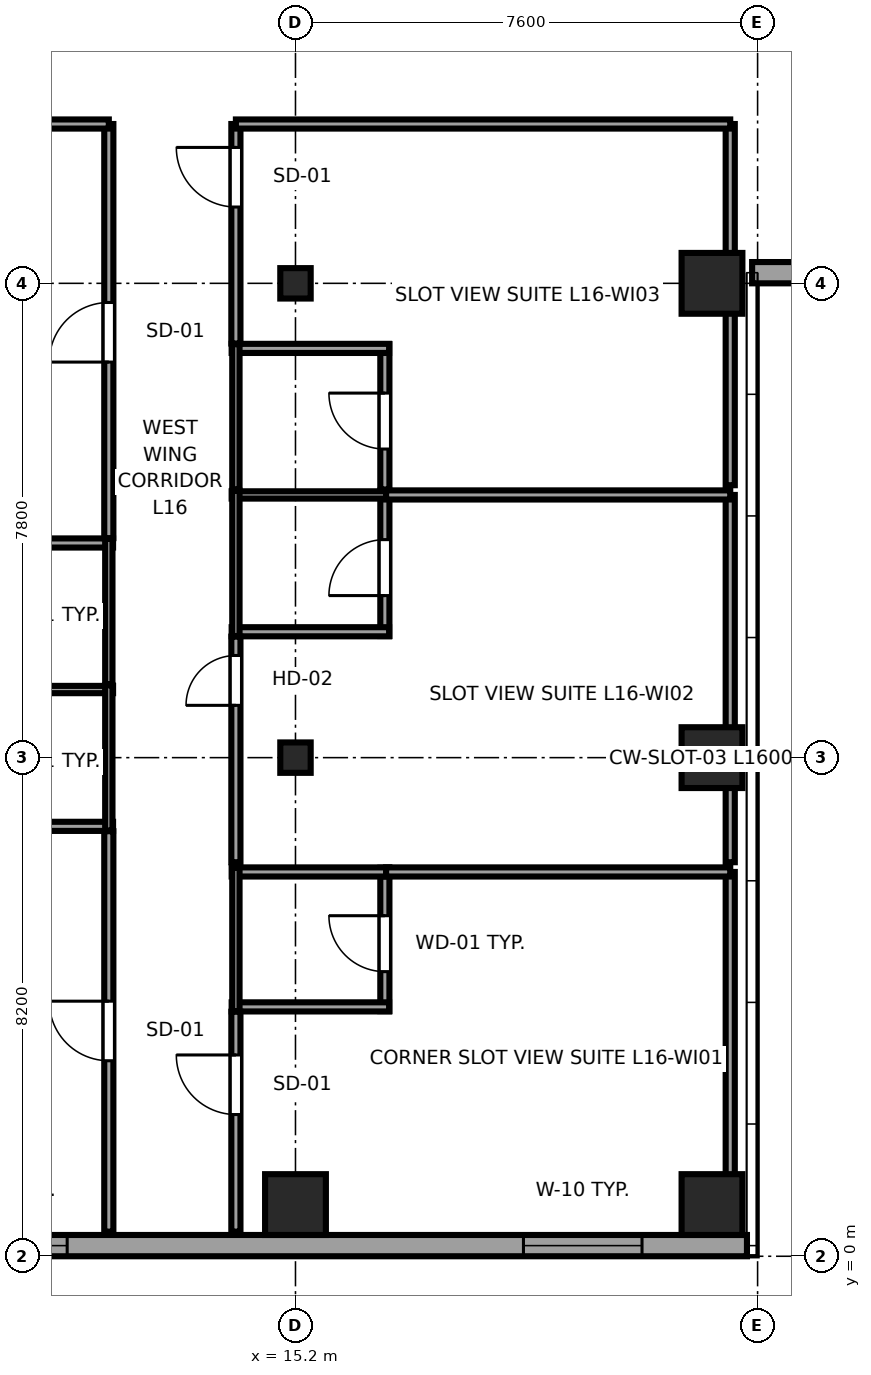
"""IFC4 building model, lengths in metres.
Left out: names, types, materials, properties, quantities, classifications, styles, units other than length and angle.
Written with IfcOpenShell. Run it as: python <this file> out.ifc"""

import sys

from ifc_helpers import new_model, si_unit, direction, frame, frame_2d, origin, origin_2d, place, context, subcontext, project, spatial, rectangle, i_section, extrude, source, transform, mapped, element, fill, save


model = new_model("IFC4")
c1 = context("Model", 3, precision=1e-05, world=origin(), true_north=direction((0.0, 1.0)))
c2 = subcontext(c1, "Body", "Model", "MODEL_VIEW")
j1 = project(units=[si_unit("LENGTHUNIT", "METRE"), si_unit("PLANEANGLEUNIT", "RADIAN")], contexts=[c1])
p1 = place(None, origin())
s1 = spatial("IfcSite", under=j1, at=p1, CompositionType="ELEMENT")
p2 = place(p1, origin())
s2 = spatial("IfcBuilding", under=s1, at=p2, CompositionType="ELEMENT")
p3 = place(p2, frame((0.0, 0.0, 67.5)))
s3 = spatial("IfcBuildingStorey", under=s2, at=p3, CompositionType="ELEMENT", Elevation=67.5)
m1 = source(origin(), c2, "Body", "SweptSolid", [
    extrude(rectangle(XDim=1.0, YDim=1.0, at=origin_2d()), origin(), (0.0, 0.0, 1.0), 3.55),
])
p4 = place(p3, frame((15.2, 0.85, 0.0), z_axis=(0.0, 0.0, 1.0), x_axis=(1.0, 0.0, 0.0)))
e1 = element("IfcColumn", 1, at=p4, inside=s3, PredefinedType="COLUMN", context=c2, shape_type="MappedRepresentation", body=[
    mapped(m1, transform((0.0, 0.0, 0.0), x_axis=(1.0, 0.0, 0.0), y_axis=(0.0, 1.0, 0.0), z_axis=(0.0, 0.0, 1.0), scale=1.0)),
])
m2 = source(origin(), c2, "Body", "SweptSolid", [
    extrude(i_section(OverallWidth=0.5, OverallDepth=0.5, WebThickness=0.028, FlangeThickness=0.045, at=origin_2d()), origin(), (0.0, 0.0, 1.0), 3.55),
])
for number, where, z_axis, x_axis in (
    (2, (15.2, 8.2, 0.0), (0.0, 0.0, 1.0), (1.0, 0.0, 0.0)),
    (3, (15.2, 16.0, 0.0), (0.0, 0.0, 1.0), (1.0, 0.0, 0.0)),
):
    element("IfcColumn", number, at=place(p3, frame(where, z_axis=z_axis, x_axis=x_axis)), inside=s3, PredefinedType="COLUMN", context=c2, shape_type="MappedRepresentation", body=[
        mapped(m2, transform((0.0, 0.0, 0.0), x_axis=(1.0, 0.0, 0.0), y_axis=(0.0, 1.0, 0.0), z_axis=(0.0, 0.0, 1.0), scale=1.0)),
    ])
for number, where, z_axis, x_axis in (
    (4, (22.05, 0.85, 0.0), (0.0, 0.0, 1.0), (1.0, 0.0, 0.0)),
    (5, (22.05, 8.2, 0.0), (0.0, 0.0, 1.0), (1.0, 0.0, 0.0)),
    (6, (22.05, 16.0, 0.0), (0.0, 0.0, 1.0), (1.0, 0.0, 0.0)),
):
    element("IfcColumn", number, at=place(p3, frame(where, z_axis=z_axis, x_axis=x_axis)), inside=s3, PredefinedType="COLUMN", context=c2, shape_type="MappedRepresentation", body=[
        mapped(m1, transform((0.0, 0.0, 0.0), x_axis=(1.0, 0.0, 0.0), y_axis=(0.0, 1.0, 0.0), z_axis=(0.0, 0.0, 1.0), scale=1.0)),
    ])
p5 = place(p3, frame((4.617, 0.175, 0.0), z_axis=(0.0, 0.0, 1.0), x_axis=(1.0, 0.0, 0.0)))
e7 = element("IfcWall", 7, at=p5, inside=s3, PredefinedType="SOLIDWALL", context=c2, shape_type="SweptSolid", body=[
    extrude(rectangle(XDim=18.008, YDim=0.35, at=frame_2d((9.004, 0.0))), origin(), (0.0, 0.0, 1.0), 3.37),
])
p6 = place(p5, frame((4.878, 0.0, 0.68)))
e8 = element("IfcOpeningElement", 8, at=p6, cuts=e7, PredefinedType="OPENING", context=c2, shape_type="SweptSolid", body=[
    extrude(rectangle(XDim=1.95, YDim=1.82, at=frame_2d((0.975, 0.91))), frame((0.0, 0.185, 0.0), z_axis=(0.0, -1.0, 0.0), x_axis=(1.0, 0.0, 0.0)), (0.0, 0.0, 1.0), 0.37),
])
p7 = place(p5, frame((14.332, 0.0, 0.68)))
e9 = element("IfcOpeningElement", 9, at=p7, cuts=e7, PredefinedType="OPENING", context=c2, shape_type="SweptSolid", body=[
    extrude(rectangle(XDim=1.95, YDim=1.82, at=frame_2d((0.975, 0.91))), frame((0.0, 0.185, 0.0), z_axis=(0.0, -1.0, 0.0), x_axis=(1.0, 0.0, 0.0)), (0.0, 0.0, 1.0), 0.37),
])
p8 = place(p3, frame((22.71, 16.175, 0.0), z_axis=(0.0, 0.0, 1.0), x_axis=(1.0, 0.0, 0.0)))
e10 = element("IfcWall", 10, at=p8, inside=s3, PredefinedType="SOLIDWALL", context=c2, shape_type="SweptSolid", body=[
    extrude(rectangle(XDim=11.58, YDim=0.35, at=frame_2d((5.79, 0.0))), origin(), (0.0, 0.0, 1.0), 2.748),
])
p9 = place(p8, frame((2.22, 0.0, 0.68)))
e11 = element("IfcOpeningElement", 11, at=p9, cuts=e10, PredefinedType="OPENING", context=c2, shape_type="SweptSolid", body=[
    extrude(rectangle(XDim=1.95, YDim=1.82, at=frame_2d((0.975, 0.91))), frame((0.0, 0.185, 0.0), z_axis=(0.0, -1.0, 0.0), x_axis=(1.0, 0.0, 0.0)), (0.0, 0.0, 1.0), 0.37),
])
p10 = place(p8, frame((7.41, 0.0, 0.68)))
e12 = element("IfcOpeningElement", 12, at=p10, cuts=e10, PredefinedType="OPENING", context=c2, shape_type="SweptSolid", body=[
    extrude(rectangle(XDim=1.95, YDim=1.82, at=frame_2d((0.975, 0.91))), frame((0.0, 0.185, 0.0), z_axis=(0.0, -1.0, 0.0), x_axis=(1.0, 0.0, 0.0)), (0.0, 0.0, 1.0), 0.37),
])
p11 = place(p3, frame((9.61, 7.07, 0.0), z_axis=(0.0, 0.0, 1.0), x_axis=(1.0, 0.0, 0.0)))
e13 = element("IfcWall", 13, at=p11, inside=s3, PredefinedType="PARTITIONING", context=c2, shape_type="SweptSolid", body=[
    extrude(rectangle(XDim=2.59, YDim=0.15, at=frame_2d((1.295, 0.0))), origin(), (0.0, 0.0, 1.0), 3.37),
])
p12 = place(p3, frame((9.61, 9.32, 0.0), z_axis=(0.0, 0.0, 1.0), x_axis=(1.0, 0.0, 0.0)))
e14 = element("IfcWall", 14, at=p12, inside=s3, PredefinedType="PLUMBINGWALL", context=c2, shape_type="SweptSolid", body=[
    extrude(rectangle(XDim=2.59, YDim=0.12, at=frame_2d((1.295, 0.0))), origin(), (0.0, 0.0, 1.0), 3.37),
])
p13 = place(p3, frame((12.13, 7.0, 0.0), z_axis=(0.0, 0.0, 1.0), x_axis=(0.0, 1.0, 0.0)))
e15 = element("IfcWall", 15, at=p13, inside=s3, PredefinedType="PLUMBINGWALL", context=c2, shape_type="SweptSolid", body=[
    extrude(rectangle(XDim=2.39, YDim=0.12, at=frame_2d((1.195, 0.0))), origin(), (0.0, 0.0, 1.0), 3.37),
])
p14 = place(p3, frame((9.61, 11.73, 0.0), z_axis=(0.0, 0.0, 1.0), x_axis=(1.0, 0.0, 0.0)))
e16 = element("IfcWall", 16, at=p14, inside=s3, PredefinedType="PARTITIONING", context=c2, shape_type="SweptSolid", body=[
    extrude(rectangle(XDim=2.59, YDim=0.15, at=frame_2d((1.295, 0.0))), origin(), (0.0, 0.0, 1.0), 3.37),
])
p15 = place(p3, frame((12.13, 9.41, 0.0), z_axis=(0.0, 0.0, 1.0), x_axis=(0.0, 1.0, 0.0)))
e17 = element("IfcWall", 17, at=p15, inside=s3, PredefinedType="PLUMBINGWALL", context=c2, shape_type="SweptSolid", body=[
    extrude(rectangle(XDim=2.39, YDim=0.12, at=frame_2d((1.195, 0.0))), origin(), (0.0, 0.0, 1.0), 3.37),
])
p16 = place(p3, frame((16.67, 4.031, 0.0), z_axis=(0.0, 0.0, 1.0), x_axis=(0.0, 1.0, 0.0)))
e18 = element("IfcWall", 18, at=p16, inside=s3, PredefinedType="PARTITIONING", context=c2, shape_type="SweptSolid", body=[
    extrude(rectangle(XDim=2.359, YDim=0.15, at=frame_2d((1.179, 0.0))), origin(), (0.0, 0.0, 1.0), 3.37),
])
p17 = place(p16, frame((0.649, 0.0, 0.0)))
e19 = element("IfcOpeningElement", 19, at=p17, cuts=e18, PredefinedType="OPENING", context=c2, shape_type="SweptSolid", body=[
    extrude(rectangle(XDim=0.92, YDim=2.01, at=frame_2d((0.46, 1.005))), frame((0.0, 0.085, 0.0), z_axis=(0.0, -1.0, 0.0), x_axis=(1.0, 0.0, 0.0)), (0.0, 0.0, 1.0), 0.17),
])
for number, where, z_axis, x_axis in (
    (20, (14.15, 4.101, 0.0), (0.0, 0.0, 1.0), (1.0, 0.0, 0.0)),
    (21, (14.15, 6.32, 0.0), (0.0, 0.0, 1.0), (1.0, 0.0, 0.0)),
):
    element("IfcWall", number, at=place(p3, frame(where, z_axis=z_axis, x_axis=x_axis)), inside=s3, PredefinedType="PARTITIONING", context=c2, shape_type="SweptSolid", body=[
        extrude(rectangle(XDim=2.59, YDim=0.15, at=frame_2d((1.295, 0.0))), origin(), (0.0, 0.0, 1.0), 3.37),
    ])
p18 = place(p3, frame((14.22, 4.031, 0.0), z_axis=(0.0, 0.0, 1.0), x_axis=(0.0, 1.0, 0.0)))
e22 = element("IfcWall", 22, at=p18, inside=s3, PredefinedType="PLUMBINGWALL", context=c2, shape_type="SweptSolid", body=[
    extrude(rectangle(XDim=2.359, YDim=0.12, at=frame_2d((1.179, 0.0))), origin(), (0.0, 0.0, 1.0), 3.37),
])
p19 = place(p3, frame((16.67, 10.2, 0.0), z_axis=(0.0, 0.0, 1.0), x_axis=(0.0, 1.0, 0.0)))
e23 = element("IfcWall", 23, at=p19, inside=s3, PredefinedType="PARTITIONING", context=c2, shape_type="SweptSolid", body=[
    extrude(rectangle(XDim=2.39, YDim=0.15, at=frame_2d((1.195, 0.0))), origin(), (0.0, 0.0, 1.0), 3.37),
])
p20 = place(p19, frame((0.665, 0.0, 0.0)))
e24 = element("IfcOpeningElement", 24, at=p20, cuts=e23, PredefinedType="OPENING", context=c2, shape_type="SweptSolid", body=[
    extrude(rectangle(XDim=0.92, YDim=2.01, at=frame_2d((0.46, 1.005))), frame((0.0, 0.085, 0.0), z_axis=(0.0, -1.0, 0.0), x_axis=(1.0, 0.0, 0.0)), (0.0, 0.0, 1.0), 0.17),
])
p21 = place(p3, frame((14.15, 10.27, 0.0), z_axis=(0.0, 0.0, 1.0), x_axis=(1.0, 0.0, 0.0)))
e25 = element("IfcWall", 25, at=p21, inside=s3, PredefinedType="PARTITIONING", context=c2, shape_type="SweptSolid", body=[
    extrude(rectangle(XDim=2.59, YDim=0.15, at=frame_2d((1.295, 0.0))), origin(), (0.0, 0.0, 1.0), 3.37),
])
p22 = place(p3, frame((14.15, 12.52, 0.0), z_axis=(0.0, 0.0, 1.0), x_axis=(1.0, 0.0, 0.0)))
e26 = element("IfcWall", 26, at=p22, inside=s3, PredefinedType="PLUMBINGWALL", context=c2, shape_type="SweptSolid", body=[
    extrude(rectangle(XDim=2.59, YDim=0.12, at=frame_2d((1.295, 0.0))), origin(), (0.0, 0.0, 1.0), 3.37),
])
p23 = place(p3, frame((14.22, 10.2, 0.0), z_axis=(0.0, 0.0, 1.0), x_axis=(0.0, 1.0, 0.0)))
e27 = element("IfcWall", 27, at=p23, inside=s3, PredefinedType="PLUMBINGWALL", context=c2, shape_type="SweptSolid", body=[
    extrude(rectangle(XDim=2.39, YDim=0.12, at=frame_2d((1.195, 0.0))), origin(), (0.0, 0.0, 1.0), 3.37),
])
p24 = place(p3, frame((16.67, 12.61, 0.0), z_axis=(0.0, 0.0, 1.0), x_axis=(0.0, 1.0, 0.0)))
e28 = element("IfcWall", 28, at=p24, inside=s3, PredefinedType="PARTITIONING", context=c2, shape_type="SweptSolid", body=[
    extrude(rectangle(XDim=2.39, YDim=0.15, at=frame_2d((1.195, 0.0))), origin(), (0.0, 0.0, 1.0), 3.37),
])
p25 = place(p24, frame((0.665, 0.0, 0.0)))
e29 = element("IfcOpeningElement", 29, at=p25, cuts=e28, PredefinedType="OPENING", context=c2, shape_type="SweptSolid", body=[
    extrude(rectangle(XDim=0.92, YDim=2.01, at=frame_2d((0.46, 1.005))), frame((0.0, 0.085, 0.0), z_axis=(0.0, -1.0, 0.0), x_axis=(1.0, 0.0, 0.0)), (0.0, 0.0, 1.0), 0.17),
])
p26 = place(p3, frame((14.15, 14.93, 0.0), z_axis=(0.0, 0.0, 1.0), x_axis=(1.0, 0.0, 0.0)))
e30 = element("IfcWall", 30, at=p26, inside=s3, PredefinedType="PARTITIONING", context=c2, shape_type="SweptSolid", body=[
    extrude(rectangle(XDim=2.59, YDim=0.15, at=frame_2d((1.295, 0.0))), origin(), (0.0, 0.0, 1.0), 3.37),
])
p27 = place(p3, frame((14.22, 12.61, 0.0), z_axis=(0.0, 0.0, 1.0), x_axis=(0.0, 1.0, 0.0)))
e31 = element("IfcWall", 31, at=p27, inside=s3, PredefinedType="PLUMBINGWALL", context=c2, shape_type="SweptSolid", body=[
    extrude(rectangle(XDim=2.39, YDim=0.12, at=frame_2d((1.195, 0.0))), origin(), (0.0, 0.0, 1.0), 3.37),
])
p28 = place(p3, frame((12.13, 0.405, 0.0), z_axis=(0.0, 0.0, 1.0), x_axis=(0.0, 1.0, 0.0)))
e32 = element("IfcWall", 32, at=p28, inside=s3, PredefinedType="PARTITIONING", context=c2, shape_type="SweptSolid", body=[
    extrude(rectangle(XDim=6.585, YDim=0.15, at=frame_2d((3.292, 0.0))), origin(), (0.0, 0.0, 1.0), 3.37),
])
p29 = place(p28, frame((2.81, 0.0, 0.0)))
e33 = element("IfcOpeningElement", 33, at=p29, cuts=e32, PredefinedType="OPENING", context=c2, shape_type="SweptSolid", body=[
    extrude(rectangle(XDim=0.98, YDim=2.12, at=frame_2d((0.49, 1.06))), frame((0.0, 0.085, 0.0), z_axis=(0.0, -1.0, 0.0), x_axis=(1.0, 0.0, 0.0)), (0.0, 0.0, 1.0), 0.17),
])
p30 = place(p3, frame((12.13, 11.81, 0.0), z_axis=(0.0, 0.0, 1.0), x_axis=(0.0, 1.0, 0.0)))
e34 = element("IfcWall", 34, at=p30, inside=s3, PredefinedType="PARTITIONING", context=c2, shape_type="SweptSolid", body=[
    extrude(rectangle(XDim=6.81, YDim=0.15, at=frame_2d((3.405, 0.0))), origin(), (0.0, 0.0, 1.0), 3.37),
])
p31 = place(p30, frame((2.895, 0.0, 0.0)))
e35 = element("IfcOpeningElement", 35, at=p31, cuts=e34, PredefinedType="OPENING", context=c2, shape_type="SweptSolid", body=[
    extrude(rectangle(XDim=0.98, YDim=2.12, at=frame_2d((0.49, 1.06))), frame((0.0, 0.085, 0.0), z_axis=(0.0, -1.0, 0.0), x_axis=(1.0, 0.0, 0.0)), (0.0, 0.0, 1.0), 0.17),
])
p32 = place(p3, frame((0.405, 18.62, 0.0), z_axis=(0.0, 0.0, 1.0), x_axis=(1.0, 0.0, 0.0)))
e36 = element("IfcWall", 36, at=p32, inside=s3, PredefinedType="PARTITIONING", context=c2, shape_type="SweptSolid", body=[
    extrude(rectangle(XDim=11.725, YDim=0.15, at=frame_2d((5.862, 0.0))), origin(), (0.0, 0.0, 1.0), 3.37),
])
p33 = place(p3, frame((14.22, 0.405, 0.0), z_axis=(0.0, 0.0, 1.0), x_axis=(0.0, 1.0, 0.0)))
e37 = element("IfcWall", 37, at=p33, inside=s3, PredefinedType="PARTITIONING", context=c2, shape_type="SweptSolid", body=[
    extrude(rectangle(XDim=3.616, YDim=0.15, at=frame_2d((1.808, 0.0))), origin(), (0.0, 0.0, 1.0), 3.37),
])
p34 = place(p33, frame((1.926, 0.0, 0.0)))
e38 = element("IfcOpeningElement", 38, at=p34, cuts=e37, PredefinedType="OPENING", context=c2, shape_type="SweptSolid", body=[
    extrude(rectangle(XDim=0.98, YDim=2.12, at=frame_2d((0.49, 1.06))), frame((0.0, 0.085, 0.0), z_axis=(0.0, -1.0, 0.0), x_axis=(1.0, 0.0, 0.0)), (0.0, 0.0, 1.0), 0.17),
])
p35 = place(p3, frame((22.35, 0.405, 0.0), z_axis=(0.0, 0.0, 1.0), x_axis=(0.0, 1.0, 0.0)))
e39 = element("IfcWall", 39, at=p35, inside=s3, PredefinedType="PARTITIONING", context=c2, shape_type="SweptSolid", body=[
    extrude(rectangle(XDim=5.915, YDim=0.15, at=frame_2d((2.958, 0.0))), origin(), (0.0, 0.0, 1.0), 3.37),
])
p36 = place(p3, frame((16.69, 6.32, 0.0), z_axis=(0.0, 0.0, 1.0), x_axis=(1.0, 0.0, 0.0)))
e40 = element("IfcWall", 40, at=p36, inside=s3, PredefinedType="PARTITIONING", context=c2, shape_type="SweptSolid", body=[
    extrude(rectangle(XDim=5.66, YDim=0.15, at=frame_2d((2.83, 0.0))), origin(), (0.0, 0.0, 1.0), 3.37),
])
p37 = place(p3, frame((14.22, 6.48, 0.0), z_axis=(0.0, 0.0, 1.0), x_axis=(0.0, 1.0, 0.0)))
e41 = element("IfcWall", 41, at=p37, inside=s3, PredefinedType="PARTITIONING", context=c2, shape_type="SweptSolid", body=[
    extrude(rectangle(XDim=3.71, YDim=0.15, at=frame_2d((1.855, 0.0))), origin(), (0.0, 0.0, 1.0), 3.37),
])
p38 = place(p37, frame((2.58, 0.0, 0.0)))
e42 = element("IfcOpeningElement", 42, at=p38, cuts=e41, PredefinedType="OPENING", context=c2, shape_type="SweptSolid", body=[
    extrude(rectangle(XDim=0.82, YDim=2.01, at=frame_2d((0.41, 1.005))), frame((0.0, 0.085, 0.0), z_axis=(0.0, -1.0, 0.0), x_axis=(1.0, 0.0, 0.0)), (0.0, 0.0, 1.0), 0.17),
])
p39 = place(p3, frame((22.35, 6.48, 0.0), z_axis=(0.0, 0.0, 1.0), x_axis=(0.0, 1.0, 0.0)))
e43 = element("IfcWall", 43, at=p39, inside=s3, PredefinedType="PARTITIONING", context=c2, shape_type="SweptSolid", body=[
    extrude(rectangle(XDim=6.04, YDim=0.15, at=frame_2d((3.02, 0.0))), origin(), (0.0, 0.0, 1.0), 3.37),
])
p40 = place(p3, frame((16.69, 12.52, 0.0), z_axis=(0.0, 0.0, 1.0), x_axis=(1.0, 0.0, 0.0)))
e44 = element("IfcWall", 44, at=p40, inside=s3, PredefinedType="PARTITIONING", context=c2, shape_type="SweptSolid", body=[
    extrude(rectangle(XDim=5.66, YDim=0.15, at=frame_2d((2.83, 0.0))), origin(), (0.0, 0.0, 1.0), 3.37),
])
p41 = place(p3, frame((14.22, 15.01, 0.0), z_axis=(0.0, 0.0, 1.0), x_axis=(0.0, 1.0, 0.0)))
e45 = element("IfcWall", 45, at=p41, inside=s3, PredefinedType="PARTITIONING", context=c2, shape_type="SweptSolid", body=[
    extrude(rectangle(XDim=3.61, YDim=0.15, at=frame_2d((1.805, 0.0))), origin(), (0.0, 0.0, 1.0), 3.37),
])
p42 = place(p41, frame((2.245, 0.0, 0.0)))
e46 = element("IfcOpeningElement", 46, at=p42, cuts=e45, PredefinedType="OPENING", context=c2, shape_type="SweptSolid", body=[
    extrude(rectangle(XDim=0.98, YDim=2.12, at=frame_2d((0.49, 1.06))), frame((0.0, 0.085, 0.0), z_axis=(0.0, -1.0, 0.0), x_axis=(1.0, 0.0, 0.0)), (0.0, 0.0, 1.0), 0.17),
])
p43 = place(p3, frame((22.35, 12.68, 0.0), z_axis=(0.0, 0.0, 1.0), x_axis=(0.0, 1.0, 0.0)))
e47 = element("IfcWall", 47, at=p43, inside=s3, PredefinedType="PARTITIONING", context=c2, shape_type="SweptSolid", body=[
    extrude(rectangle(XDim=5.94, YDim=0.15, at=frame_2d((2.97, 0.0))), origin(), (0.0, 0.0, 1.0), 3.37),
])
p44 = place(p3, frame((14.22, 18.62, 0.0), z_axis=(0.0, 0.0, 1.0), x_axis=(1.0, 0.0, 0.0)))
e48 = element("IfcWall", 48, at=p44, inside=s3, PredefinedType="PARTITIONING", context=c2, shape_type="SweptSolid", body=[
    extrude(rectangle(XDim=8.13, YDim=0.15, at=frame_2d((4.065, 0.0))), origin(), (0.0, 0.0, 1.0), 3.37),
])
m3 = source(origin(), c2, "Body", "SweptSolid", [
    extrude(rectangle(XDim=1.95, YDim=1.82, at=frame_2d((0.975, 0.91))), frame((0.0, 0.09, 0.0), z_axis=(0.0, -1.0, 0.0), x_axis=(1.0, 0.0, 0.0)), (0.0, 0.0, 1.0), 0.06),
])
p45 = place(p6, origin())
e49 = element("IfcWindow", 49, at=p45, inside=s3, PartitioningType="DOUBLE_PANEL_VERTICAL", PredefinedType="WINDOW", context=c2, shape_type="MappedRepresentation", body=[
    mapped(m3, transform((0.0, 0.0, 0.0), x_axis=(1.0, 0.0, 0.0), y_axis=(0.0, 1.0, 0.0), z_axis=(0.0, 0.0, 1.0), scale=1.0)),
])
fill(e8, e49)
p46 = place(p7, origin())
e50 = element("IfcWindow", 50, at=p46, inside=s3, PartitioningType="DOUBLE_PANEL_VERTICAL", PredefinedType="WINDOW", context=c2, shape_type="MappedRepresentation", body=[
    mapped(m3, transform((0.0, 0.0, 0.0), x_axis=(1.0, 0.0, 0.0), y_axis=(0.0, 1.0, 0.0), z_axis=(0.0, 0.0, 1.0), scale=1.0)),
])
fill(e9, e50)
m4 = source(origin(), c2, "Body", "SweptSolid", [
    extrude(rectangle(XDim=0.92, YDim=2.01, at=frame_2d((0.46, 1.005))), frame((0.0, 0.025, 0.0), z_axis=(0.0, -1.0, 0.0), x_axis=(1.0, 0.0, 0.0)), (0.0, 0.0, 1.0), 0.05),
])
p47 = place(p17, origin())
e51 = element("IfcDoor", 51, at=p47, inside=s3, OperationType="SINGLE_SWING_RIGHT", PredefinedType="DOOR", context=c2, shape_type="MappedRepresentation", body=[
    mapped(m4, transform((0.0, 0.0, 0.0), x_axis=(1.0, 0.0, 0.0), y_axis=(0.0, 1.0, 0.0), z_axis=(0.0, 0.0, 1.0), scale=1.0)),
])
fill(e19, e51)
p48 = place(p20, origin())
e52 = element("IfcDoor", 52, at=p48, inside=s3, OperationType="SINGLE_SWING_LEFT", PredefinedType="DOOR", context=c2, shape_type="MappedRepresentation", body=[
    mapped(m4, transform((0.0, 0.0, 0.0), x_axis=(1.0, 0.0, 0.0), y_axis=(0.0, 1.0, 0.0), z_axis=(0.0, 0.0, 1.0), scale=1.0)),
])
fill(e24, e52)
p49 = place(p25, origin())
e53 = element("IfcDoor", 53, at=p49, inside=s3, OperationType="SINGLE_SWING_RIGHT", PredefinedType="DOOR", context=c2, shape_type="MappedRepresentation", body=[
    mapped(m4, transform((0.0, 0.0, 0.0), x_axis=(1.0, 0.0, 0.0), y_axis=(0.0, 1.0, 0.0), z_axis=(0.0, 0.0, 1.0), scale=1.0)),
])
fill(e29, e53)
m5 = source(origin(), c2, "Body", "SweptSolid", [
    extrude(rectangle(XDim=0.98, YDim=2.12, at=frame_2d((0.49, 1.06))), frame((0.0, 0.025, 0.0), z_axis=(0.0, -1.0, 0.0), x_axis=(1.0, 0.0, 0.0)), (0.0, 0.0, 1.0), 0.05),
])
p50 = place(p29, origin())
e54 = element("IfcDoor", 54, at=p50, inside=s3, OperationType="SINGLE_SWING_RIGHT", PredefinedType="DOOR", context=c2, shape_type="MappedRepresentation", body=[
    mapped(m5, transform((0.0, 0.0, 0.0), x_axis=(1.0, 0.0, 0.0), y_axis=(0.0, 1.0, 0.0), z_axis=(0.0, 0.0, 1.0), scale=1.0)),
])
fill(e33, e54)
p51 = place(p31, origin())
e55 = element("IfcDoor", 55, at=p51, inside=s3, OperationType="SINGLE_SWING_LEFT", PredefinedType="DOOR", context=c2, shape_type="MappedRepresentation", body=[
    mapped(m5, transform((0.0, 0.0, 0.0), x_axis=(1.0, 0.0, 0.0), y_axis=(0.0, 1.0, 0.0), z_axis=(0.0, 0.0, 1.0), scale=1.0)),
])
fill(e35, e55)
p52 = place(p34, origin())
e56 = element("IfcDoor", 56, at=p52, inside=s3, OperationType="SINGLE_SWING_RIGHT", PredefinedType="DOOR", context=c2, shape_type="MappedRepresentation", body=[
    mapped(m5, transform((0.0, 0.0, 0.0), x_axis=(1.0, 0.0, 0.0), y_axis=(0.0, 1.0, 0.0), z_axis=(0.0, 0.0, 1.0), scale=1.0)),
])
fill(e38, e56)
m6 = source(origin(), c2, "Body", "SweptSolid", [
    extrude(rectangle(XDim=0.82, YDim=2.01, at=frame_2d((0.41, 1.005))), frame((0.0, 0.025, 0.0), z_axis=(0.0, -1.0, 0.0), x_axis=(1.0, 0.0, 0.0)), (0.0, 0.0, 1.0), 0.05),
])
p53 = place(p38, origin())
e57 = element("IfcDoor", 57, at=p53, inside=s3, OperationType="SINGLE_SWING_LEFT", PredefinedType="DOOR", context=c2, shape_type="MappedRepresentation", body=[
    mapped(m6, transform((0.0, 0.0, 0.0), x_axis=(1.0, 0.0, 0.0), y_axis=(0.0, 1.0, 0.0), z_axis=(0.0, 0.0, 1.0), scale=1.0)),
])
fill(e42, e57)
p54 = place(p42, origin())
e58 = element("IfcDoor", 58, at=p54, inside=s3, OperationType="SINGLE_SWING_RIGHT", PredefinedType="DOOR", context=c2, shape_type="MappedRepresentation", body=[
    mapped(m5, transform((0.0, 0.0, 0.0), x_axis=(1.0, 0.0, 0.0), y_axis=(0.0, 1.0, 0.0), z_axis=(0.0, 0.0, 1.0), scale=1.0)),
])
fill(e46, e58)
save(model, sys.argv[1])
